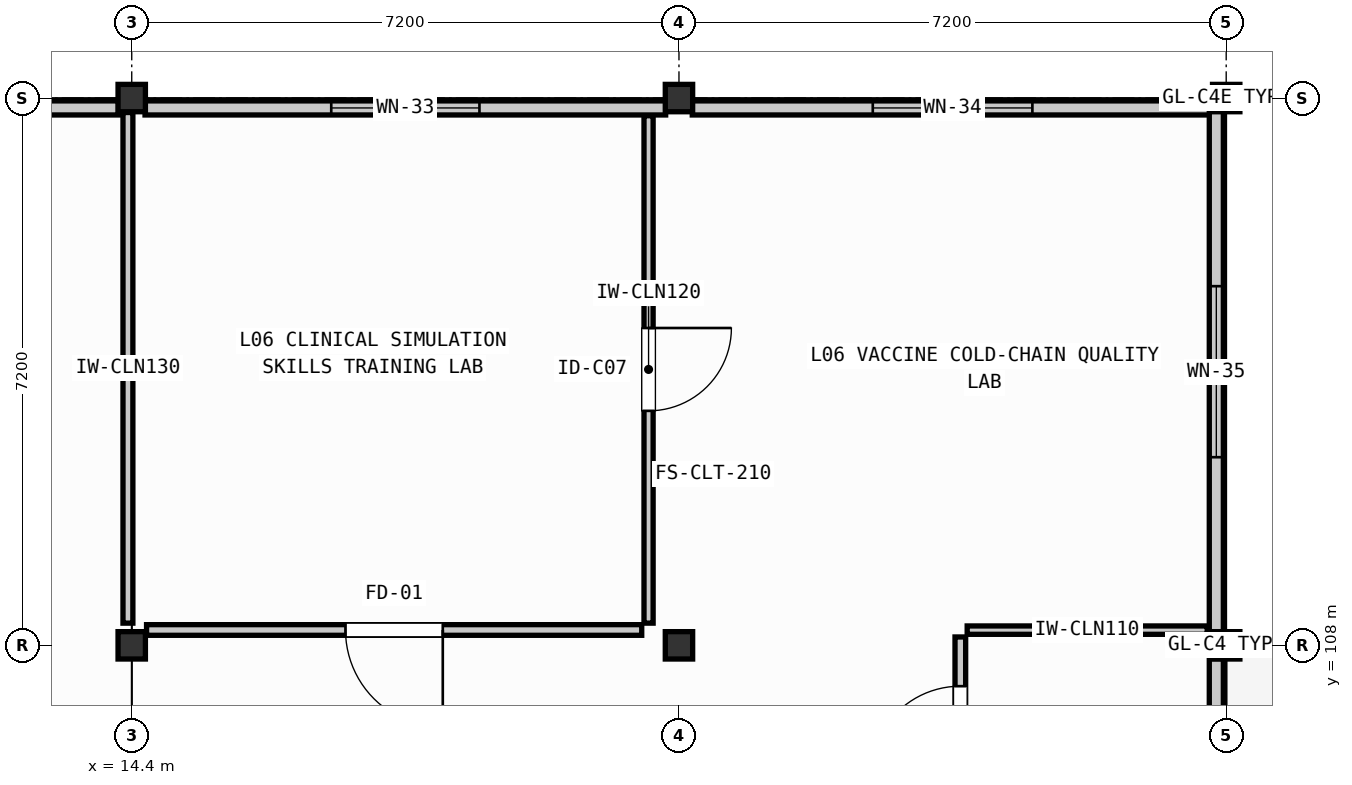
"""IFC4 building model, lengths in metres.
Left out: names, types, materials, properties, quantities, classifications, styles, units other than length and angle.
Written with IfcOpenShell. Run it as: python <this file> out.ifc"""

import sys

from ifc_helpers import new_model, si_unit, direction, frame, frame_2d, origin, origin_2d, place, context, subcontext, project, spatial, rectangle, extrude, element, fill, save


model = new_model("IFC4")
c1 = context("Model", 3, precision=1e-05, world=origin(), true_north=direction((0.0, 1.0)))
c2 = subcontext(c1, "Body", "Model", "MODEL_VIEW")
j1 = project(units=[si_unit("LENGTHUNIT", "METRE"), si_unit("PLANEANGLEUNIT", "RADIAN")], contexts=[c1])
p1 = place(None, origin())
s1 = spatial("IfcSite", under=j1, at=p1, CompositionType="ELEMENT")
p2 = place(p1, origin())
s2 = spatial("IfcBuilding", under=s1, at=p2, CompositionType="ELEMENT")
p3 = place(p2, frame((0.0, 0.0, 21.6)))
s3 = spatial("IfcBuildingStorey", under=s2, at=p3, CompositionType="ELEMENT", Elevation=21.6)
for number, where, z_axis, x_axis in (
    (1, (14.4, 108.0, 0.0), (0.0, 0.0, 1.0), (1.0, 0.0, 0.0)),
    (2, (14.4, 115.2, 0.0), (0.0, 0.0, 1.0), (1.0, 0.0, 0.0)),
    (3, (21.6, 108.0, 0.0), (0.0, 0.0, 1.0), (1.0, 0.0, 0.0)),
    (4, (21.6, 115.2, 0.0), (0.0, 0.0, 1.0), (1.0, 0.0, 0.0)),
    (5, (28.8, 108.0, 0.0), (0.0, 0.0, 1.0), (1.0, 0.0, 0.0)),
    (6, (28.8, 115.2, 0.0), (0.0, 0.0, 1.0), (1.0, 0.0, 0.0)),
):
    element("IfcColumn", number, at=place(p3, frame(where, z_axis=z_axis, x_axis=x_axis)), inside=s3, PredefinedType="COLUMN", context=c2, shape_type="SweptSolid", body=[
        extrude(rectangle(XDim=0.36, YDim=0.36, at=origin_2d()), origin(), (0.0, 0.0, 1.0), 3.69),
    ])
p4 = place(p3, frame((7.375, 115.07, 0.0), z_axis=(0.0, 0.0, 1.0), x_axis=(1.0, 0.0, 0.0)))
e7 = element("IfcWall", 7, at=p4, inside=s3, PredefinedType="SOLIDWALL", context=c2, shape_type="SweptSolid", body=[
    extrude(rectangle(XDim=6.85, YDim=0.185, at=frame_2d((3.425, 0.0))), origin(), (0.0, 0.0, 1.0), 3.13),
])
p5 = place(p4, frame((2.525, 0.0, 0.95)))
e8 = element("IfcOpeningElement", 8, at=p5, cuts=e7, PredefinedType="OPENING", context=c2, shape_type="SweptSolid", body=[
    extrude(rectangle(XDim=1.8, YDim=1.25, at=frame_2d((0.9, 0.625))), frame((0.0, 0.103, 0.0), z_axis=(0.0, -1.0, 0.0), x_axis=(1.0, 0.0, 0.0)), (0.0, 0.0, 1.0), 0.205),
])
p6 = place(p3, frame((14.575, 115.07, 0.0), z_axis=(0.0, 0.0, 1.0), x_axis=(1.0, 0.0, 0.0)))
e9 = element("IfcWall", 9, at=p6, inside=s3, PredefinedType="SOLIDWALL", context=c2, shape_type="SweptSolid", body=[
    extrude(rectangle(XDim=6.85, YDim=0.185, at=frame_2d((3.425, 0.0))), origin(), (0.0, 0.0, 1.0), 3.13),
])
p7 = place(p6, frame((2.45, 0.0, 0.95)))
e10 = element("IfcOpeningElement", 10, at=p7, cuts=e9, PredefinedType="OPENING", context=c2, shape_type="SweptSolid", body=[
    extrude(rectangle(XDim=1.95, YDim=1.25, at=frame_2d((0.975, 0.625))), frame((0.0, 0.103, 0.0), z_axis=(0.0, -1.0, 0.0), x_axis=(1.0, 0.0, 0.0)), (0.0, 0.0, 1.0), 0.205),
])
p8 = place(p3, frame((21.775, 115.07, 0.0), z_axis=(0.0, 0.0, 1.0), x_axis=(1.0, 0.0, 0.0)))
e11 = element("IfcWall", 11, at=p8, inside=s3, PredefinedType="SOLIDWALL", context=c2, shape_type="SweptSolid", body=[
    extrude(rectangle(XDim=6.85, YDim=0.185, at=frame_2d((3.425, 0.0))), origin(), (0.0, 0.0, 1.0), 3.13),
])
p9 = place(p8, frame((2.375, 0.0, 0.95)))
e12 = element("IfcOpeningElement", 12, at=p9, cuts=e11, PredefinedType="OPENING", context=c2, shape_type="SweptSolid", body=[
    extrude(rectangle(XDim=2.1, YDim=1.25, at=frame_2d((1.05, 0.625))), frame((0.0, 0.103, 0.0), z_axis=(0.0, -1.0, 0.0), x_axis=(1.0, 0.0, 0.0)), (0.0, 0.0, 1.0), 0.205),
])
p10 = place(p3, frame((28.67, 115.025, 0.0), z_axis=(0.0, 0.0, 1.0), x_axis=(0.0, -1.0, 0.0)))
e13 = element("IfcWall", 13, at=p10, inside=s3, PredefinedType="SOLIDWALL", context=c2, shape_type="SweptSolid", body=[
    extrude(rectangle(XDim=6.85, YDim=0.185, at=frame_2d((3.425, 0.0))), origin(), (0.0, 0.0, 1.0), 3.05),
])
p11 = place(p10, frame((2.3, 0.0, 0.95)))
e14 = element("IfcOpeningElement", 14, at=p11, cuts=e13, PredefinedType="OPENING", context=c2, shape_type="SweptSolid", body=[
    extrude(rectangle(XDim=2.25, YDim=1.25, at=frame_2d((1.125, 0.625))), frame((0.0, 0.103, 0.0), z_axis=(0.0, -1.0, 0.0), x_axis=(1.0, 0.0, 0.0)), (0.0, 0.0, 1.0), 0.205),
])
p12 = place(p3, frame((28.67, 107.825, 0.0), z_axis=(0.0, 0.0, 1.0), x_axis=(0.0, -1.0, 0.0)))
e15 = element("IfcWall", 15, at=p12, inside=s3, PredefinedType="SOLIDWALL", context=c2, shape_type="SweptSolid", body=[
    extrude(rectangle(XDim=6.85, YDim=0.185, at=frame_2d((3.425, 0.0))), origin(), (0.0, 0.0, 1.0), 3.05),
])
p13 = place(p12, frame((2.935, 0.0, 0.0)))
e16 = element("IfcOpeningElement", 16, at=p13, cuts=e15, PredefinedType="OPENING", context=c2, shape_type="SweptSolid", body=[
    extrude(rectangle(XDim=0.98, YDim=2.15, at=frame_2d((0.49, 1.075))), frame((0.0, 0.103, 0.0), z_axis=(0.0, -1.0, 0.0), x_axis=(1.0, 0.0, 0.0)), (0.0, 0.0, 1.0), 0.205),
])
p14 = place(p3, frame((21.2, 114.968, 0.0), z_axis=(0.0, 0.0, 1.0), x_axis=(0.0, -1.0, 0.0)))
e17 = element("IfcWall", 17, at=p14, inside=s3, PredefinedType="PARTITIONING", context=c2, shape_type="SweptSolid", body=[
    extrude(rectangle(XDim=6.676, YDim=0.12, at=frame_2d((3.338, 0.0))), origin(), (0.0, 0.0, 1.0), 3.05),
])
p15 = place(p14, frame((2.793, 0.0, 0.0)))
e18 = element("IfcOpeningElement", 18, at=p15, cuts=e17, PredefinedType="OPENING", context=c2, shape_type="SweptSolid", body=[
    extrude(rectangle(XDim=1.09, YDim=2.22, at=frame_2d((0.545, 1.11))), frame((0.0, 0.07, 0.0), z_axis=(0.0, -1.0, 0.0), x_axis=(1.0, 0.0, 0.0)), (0.0, 0.0, 1.0), 0.14),
])
p16 = place(p3, frame((21.11, 108.202, 0.0), z_axis=(0.0, 0.0, 1.0), x_axis=(-1.0, 0.0, 0.0)))
e19 = element("IfcWall", 19, at=p16, inside=s3, PredefinedType="PARTITIONING", context=c2, shape_type="SweptSolid", body=[
    extrude(rectangle(XDim=6.515, YDim=0.14, at=frame_2d((3.258, 0.0))), origin(), (0.0, 0.0, 1.0), 3.05),
])
p17 = place(p16, frame((2.617, 0.0, 0.0)))
e20 = element("IfcOpeningElement", 20, at=p17, cuts=e19, PredefinedType="OPENING", context=c2, shape_type="SweptSolid", body=[
    extrude(rectangle(XDim=1.28, YDim=2.18, at=frame_2d((0.64, 1.09))), frame((0.0, 0.08, 0.0), z_axis=(0.0, -1.0, 0.0), x_axis=(1.0, 0.0, 0.0)), (0.0, 0.0, 1.0), 0.16),
])
p18 = place(p3, frame((14.35, 108.292, 0.0), z_axis=(0.0, 0.0, 1.0), x_axis=(0.0, 1.0, 0.0)))
e21 = element("IfcWall", 21, at=p18, inside=s3, PredefinedType="PARTITIONING", context=c2, shape_type="SweptSolid", body=[
    extrude(rectangle(XDim=6.718, YDim=0.13, at=frame_2d((3.359, 0.0))), origin(), (0.0, 0.0, 1.0), 3.05),
])
p19 = place(p3, frame((25.302, 105.635, 0.0), z_axis=(0.0, 0.0, 1.0), x_axis=(0.0, 1.0, 0.0)))
e22 = element("IfcWall", 22, at=p19, inside=s3, PredefinedType="PARTITIONING", context=c2, shape_type="SweptSolid", body=[
    extrude(rectangle(XDim=2.475, YDim=0.14, at=frame_2d((1.238, 0.0))), origin(), (0.0, 0.0, 1.0), 3.05),
])
p20 = place(p19, frame((0.647, 0.0, 0.0)))
e23 = element("IfcOpeningElement", 23, at=p20, cuts=e22, PredefinedType="OPENING", context=c2, shape_type="SweptSolid", body=[
    extrude(rectangle(XDim=1.18, YDim=2.16, at=frame_2d((0.59, 1.08))), frame((0.0, 0.08, 0.0), z_axis=(0.0, -1.0, 0.0), x_axis=(1.0, 0.0, 0.0)), (0.0, 0.0, 1.0), 0.16),
])
p21 = place(p3, frame((25.392, 108.2, 0.0), z_axis=(0.0, 0.0, 1.0), x_axis=(1.0, 0.0, 0.0)))
e24 = element("IfcWall", 24, at=p21, inside=s3, PredefinedType="PARTITIONING", context=c2, shape_type="SweptSolid", body=[
    extrude(rectangle(XDim=3.158, YDim=0.11, at=frame_2d((1.579, 0.0))), origin(), (0.0, 0.0, 1.0), 3.05),
])
p22 = place(p7, origin())
e25 = element("IfcWindow", 25, at=p22, inside=s3, PartitioningType="SINGLE_PANEL", PredefinedType="WINDOW", context=c2, shape_type="SweptSolid", body=[
    extrude(rectangle(XDim=1.95, YDim=1.25, at=frame_2d((0.975, 0.625))), frame((0.0, 0.03, 0.0), z_axis=(0.0, -1.0, 0.0), x_axis=(1.0, 0.0, 0.0)), (0.0, 0.0, 1.0), 0.06),
])
fill(e10, e25)
p23 = place(p9, origin())
e26 = element("IfcWindow", 26, at=p23, inside=s3, PartitioningType="SINGLE_PANEL", PredefinedType="WINDOW", context=c2, shape_type="SweptSolid", body=[
    extrude(rectangle(XDim=2.1, YDim=1.25, at=frame_2d((1.05, 0.625))), frame((0.0, 0.03, 0.0), z_axis=(0.0, -1.0, 0.0), x_axis=(1.0, 0.0, 0.0)), (0.0, 0.0, 1.0), 0.06),
])
fill(e12, e26)
p24 = place(p11, origin())
e27 = element("IfcWindow", 27, at=p24, inside=s3, PartitioningType="SINGLE_PANEL", PredefinedType="WINDOW", context=c2, shape_type="SweptSolid", body=[
    extrude(rectangle(XDim=2.25, YDim=1.25, at=frame_2d((1.125, 0.625))), frame((0.0, 0.03, 0.0), z_axis=(0.0, -1.0, 0.0), x_axis=(1.0, 0.0, 0.0)), (0.0, 0.0, 1.0), 0.06),
])
fill(e14, e27)
p25 = place(p17, origin())
e28 = element("IfcDoor", 28, at=p25, inside=s3, OperationType="SINGLE_SWING_RIGHT", PredefinedType="DOOR", context=c2, shape_type="SweptSolid", body=[
    extrude(rectangle(XDim=1.28, YDim=2.18, at=frame_2d((0.64, 1.09))), frame((0.0, 0.025, 0.0), z_axis=(0.0, -1.0, 0.0), x_axis=(1.0, 0.0, 0.0)), (0.0, 0.0, 1.0), 0.05),
])
fill(e20, e28)
p26 = place(p20, origin())
e29 = element("IfcDoor", 29, at=p26, inside=s3, OperationType="SINGLE_SWING_LEFT", PredefinedType="DOOR", context=c2, shape_type="SweptSolid", body=[
    extrude(rectangle(XDim=1.18, YDim=2.16, at=frame_2d((0.59, 1.08))), frame((0.0, 0.025, 0.0), z_axis=(0.0, -1.0, 0.0), x_axis=(1.0, 0.0, 0.0)), (0.0, 0.0, 1.0), 0.05),
])
fill(e23, e29)
p27 = place(p15, origin())
e30 = element("IfcDoor", 30, at=p27, inside=s3, OperationType="SINGLE_SWING_RIGHT", PredefinedType="DOOR", context=c2, shape_type="SweptSolid", body=[
    extrude(rectangle(XDim=1.09, YDim=2.22, at=frame_2d((0.545, 1.11))), frame((0.0, 0.025, 0.0), z_axis=(0.0, -1.0, 0.0), x_axis=(1.0, 0.0, 0.0)), (0.0, 0.0, 1.0), 0.05),
])
fill(e18, e30)
save(model, sys.argv[1])
